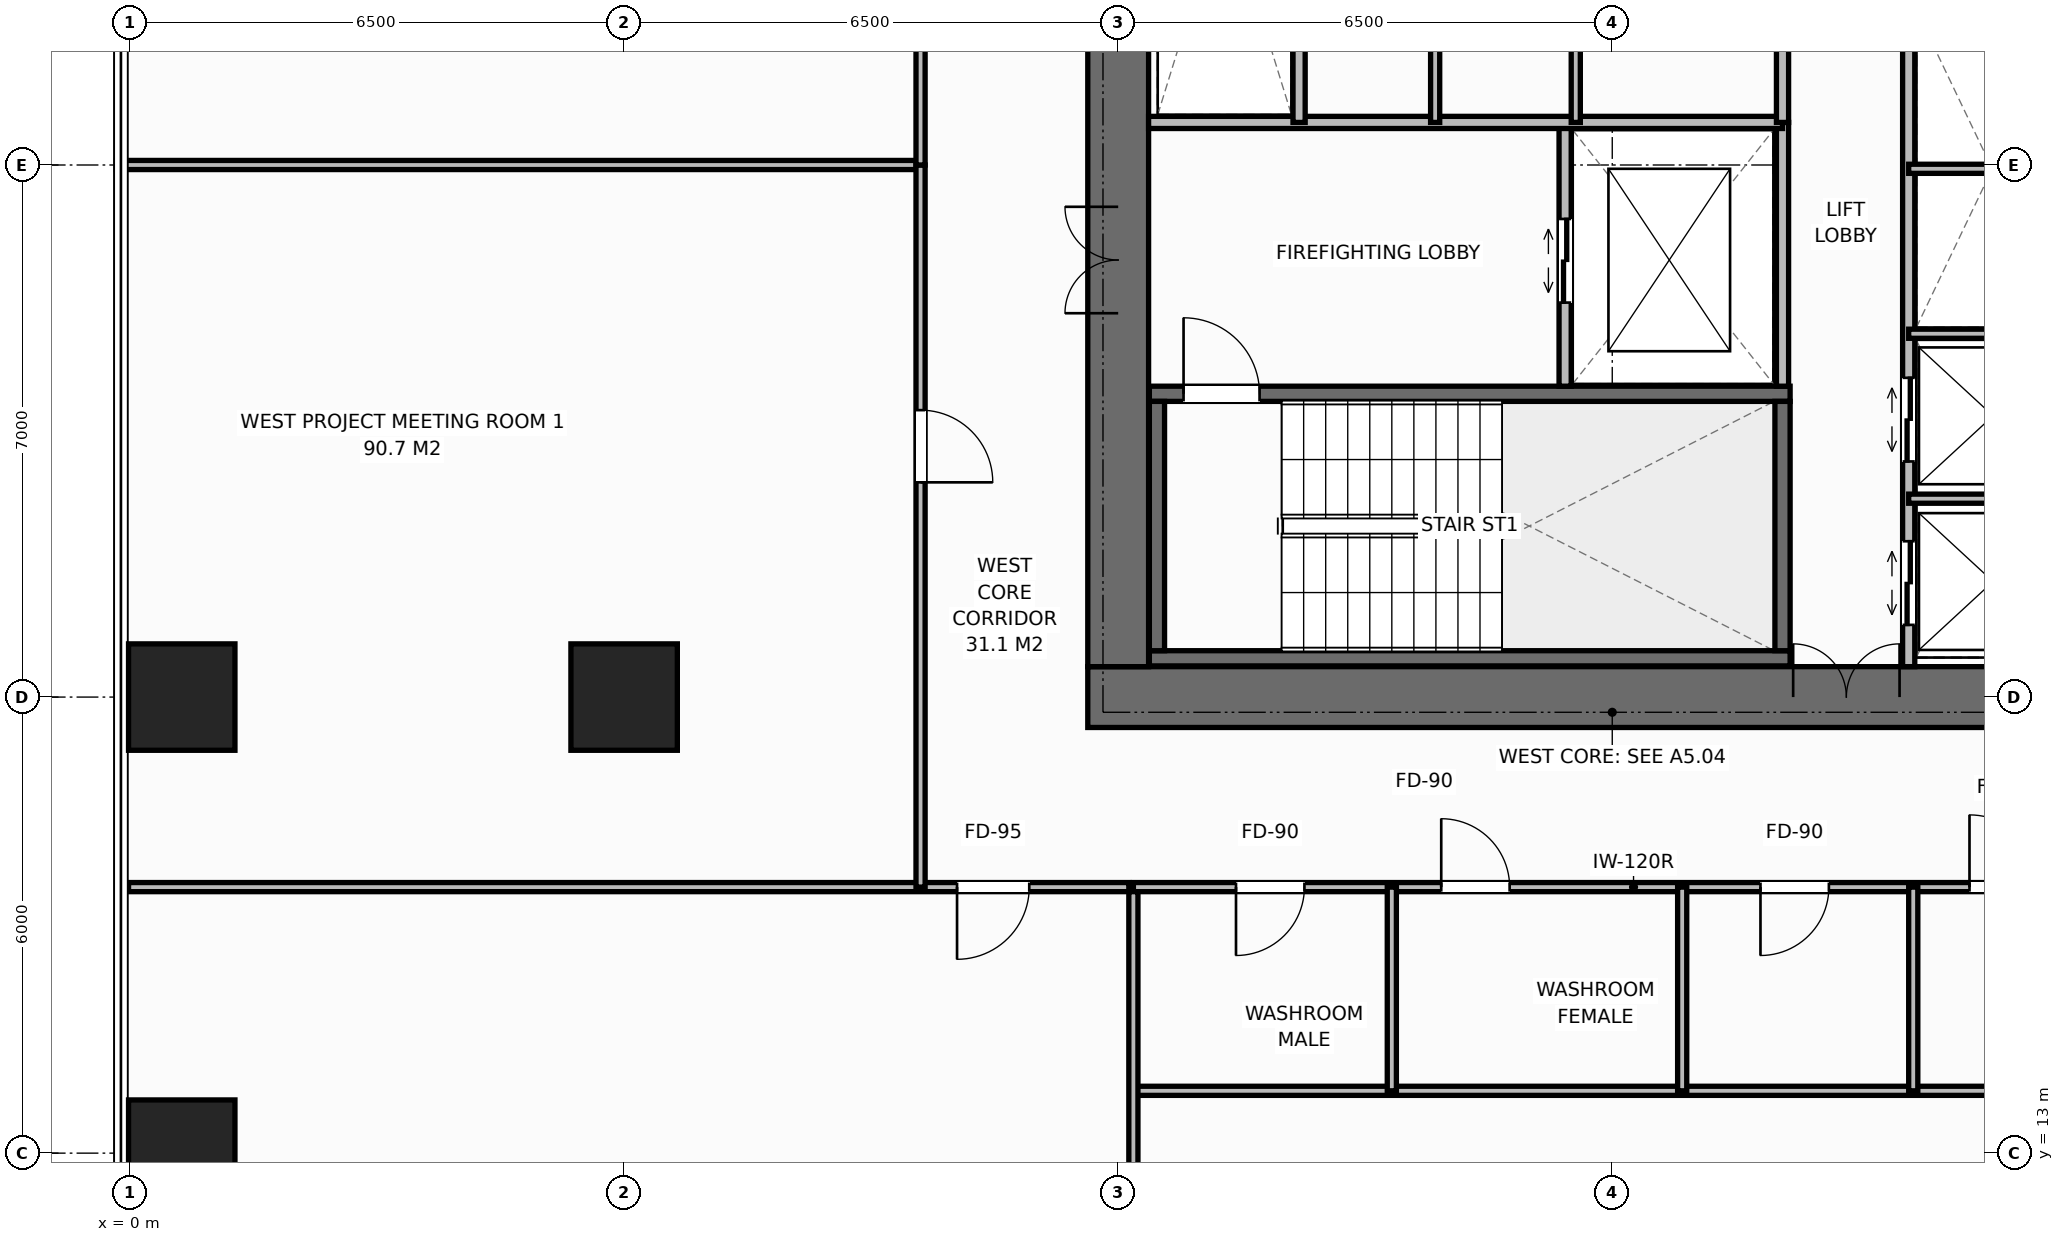
"""IFC4 building model, lengths in metres.
Left out: names, types, materials, properties, quantities, classifications, styles, units other than length and angle.
Written with IfcOpenShell. Run it as: python <this file> out.ifc"""

import sys

from ifc_helpers import new_model, si_unit, direction, frame, frame_2d, origin, origin_2d, place, context, subcontext, project, spatial, rectangle, extrude, element, fill, save


model = new_model("IFC4")
c1 = context("Model", 3, precision=1e-05, world=origin(), true_north=direction((0.0, 1.0)))
c2 = subcontext(c1, "Body", "Model", "MODEL_VIEW")
j1 = project(units=[si_unit("LENGTHUNIT", "METRE"), si_unit("PLANEANGLEUNIT", "RADIAN")], contexts=[c1])
p1 = place(None, origin())
s1 = spatial("IfcSite", under=j1, at=p1, CompositionType="ELEMENT")
p2 = place(p1, origin())
s2 = spatial("IfcBuilding", under=s1, at=p2, CompositionType="ELEMENT")
p3 = place(p2, frame((0.0, 0.0, 39.2)))
s3 = spatial("IfcBuildingStorey", under=s2, at=p3, CompositionType="ELEMENT", Elevation=39.2)
p4 = place(p3, frame((12.6, 19.0, 0.0), z_axis=(0.0, 0.0, 1.0), x_axis=(1.0, 0.0, 0.0)))
e1 = element("IfcWall", 1, at=p4, inside=s3, PredefinedType="SHEAR", context=c2, shape_type="SweptSolid", body=[
    extrude(rectangle(XDim=13.8, YDim=0.8, at=frame_2d((6.9, 0.0))), origin(), (0.0, 0.0, 1.0), 3.8),
])
p5 = place(p4, frame((9.28, 0.0, 0.0)))
e2 = element("IfcOpeningElement", 2, at=p5, cuts=e1, PredefinedType="OPENING", context=c2, shape_type="SweptSolid", body=[
    extrude(rectangle(XDim=1.4, YDim=2.2, at=frame_2d((0.7, 1.1))), frame((0.0, 0.41, 0.0), z_axis=(0.0, -1.0, 0.0), x_axis=(1.0, 0.0, 0.0)), (0.0, 0.0, 1.0), 0.82),
])
p6 = place(p3, frame((13.0, 19.4, 0.0), z_axis=(0.0, 0.0, 1.0), x_axis=(0.0, 1.0, 0.0)))
e3 = element("IfcWall", 3, at=p6, inside=s3, PredefinedType="SHEAR", context=c2, shape_type="SweptSolid", body=[
    extrude(rectangle(XDim=13.2, YDim=0.8, at=frame_2d((6.6, 0.0))), origin(), (0.0, 0.0, 1.0), 3.8),
])
p7 = place(p6, frame((4.65, 0.0, 0.0)))
e4 = element("IfcOpeningElement", 4, at=p7, cuts=e3, PredefinedType="OPENING", context=c2, shape_type="SweptSolid", body=[
    extrude(rectangle(XDim=1.4, YDim=2.2, at=frame_2d((0.7, 1.1))), frame((0.0, 0.41, 0.0), z_axis=(0.0, -1.0, 0.0), x_axis=(1.0, 0.0, 0.0)), (0.0, 0.0, 1.0), 0.82),
])
p8 = place(p3, frame((13.41, 19.51, 0.0), z_axis=(0.0, 0.0, 1.0), x_axis=(1.0, 0.0, 0.0)))
e5 = element("IfcWall", 5, at=p8, inside=s3, PredefinedType="SHEAR", context=c2, shape_type="SweptSolid", body=[
    extrude(rectangle(XDim=8.43, YDim=0.2, at=frame_2d((4.215, 0.0))), origin(), (0.0, 0.0, 1.0), 3.8),
])
p9 = place(p3, frame((13.41, 22.99, 0.0), z_axis=(0.0, 0.0, 1.0), x_axis=(1.0, 0.0, 0.0)))
e6 = element("IfcWall", 6, at=p9, inside=s3, PredefinedType="SHEAR", context=c2, shape_type="SweptSolid", body=[
    extrude(rectangle(XDim=8.43, YDim=0.2, at=frame_2d((4.215, 0.0))), origin(), (0.0, 0.0, 1.0), 3.8),
])
p10 = place(p9, frame((0.45, 0.0, 0.0)))
e7 = element("IfcOpeningElement", 7, at=p10, cuts=e6, PredefinedType="OPENING", context=c2, shape_type="SweptSolid", body=[
    extrude(rectangle(XDim=1.0, YDim=2.15, at=frame_2d((0.5, 1.075))), frame((0.0, 0.11, 0.0), z_axis=(0.0, -1.0, 0.0), x_axis=(1.0, 0.0, 0.0)), (0.0, 0.0, 1.0), 0.22),
])
for number, where, z_axis, x_axis in (
    (8, (13.51, 19.61, 0.0), (0.0, 0.0, 1.0), (0.0, 1.0, 0.0)),
    (9, (21.74, 19.61, 0.0), (0.0, 0.0, 1.0), (0.0, 1.0, 0.0)),
):
    element("IfcWall", number, at=place(p3, frame(where, z_axis=z_axis, x_axis=x_axis)), inside=s3, PredefinedType="SHEAR", context=c2, shape_type="SweptSolid", body=[
        extrude(rectangle(XDim=3.28, YDim=0.2, at=frame_2d((1.64, 0.0))), origin(), (0.0, 0.0, 1.0), 3.8),
    ])
for number, where, z_axis, x_axis in (
    (10, (6.5, 19.0, 0.0), (0.0, 0.0, 1.0), (1.0, 0.0, 0.0)),
    (11, (0.68, 13.0, 0.0), (0.0, 0.0, 1.0), (1.0, 0.0, 0.0)),
    (12, (0.68, 19.0, 0.0), (0.0, 0.0, 1.0), (1.0, 0.0, 0.0)),
):
    element("IfcColumn", number, at=place(p3, frame(where, z_axis=z_axis, x_axis=x_axis)), inside=s3, PredefinedType="COLUMN", context=c2, shape_type="SweptSolid", body=[
        extrude(rectangle(XDim=1.4, YDim=1.4, at=origin_2d()), origin(), (0.0, 0.0, 1.0), 3.8),
    ])
p11 = place(p3, frame((21.74, 23.09, 0.0), z_axis=(0.0, 0.0, 1.0), x_axis=(0.0, 1.0, 0.0)))
e13 = element("IfcWall", 13, at=p11, inside=s3, PredefinedType="STANDARD", context=c2, shape_type="SweptSolid", body=[
    extrude(rectangle(XDim=3.47, YDim=0.16, at=frame_2d((1.735, 0.0))), origin(), (0.0, 0.0, 1.0), 3.55),
])
p12 = place(p3, frame((18.88, 23.09, 0.0), z_axis=(0.0, 0.0, 1.0), x_axis=(0.0, 1.0, 0.0)))
e14 = element("IfcWall", 14, at=p12, inside=s3, PredefinedType="STANDARD", context=c2, shape_type="SweptSolid", body=[
    extrude(rectangle(XDim=3.47, YDim=0.16, at=frame_2d((1.735, 0.0))), origin(), (0.0, 0.0, 1.0), 3.55),
])
p13 = place(p12, frame((1.1, 0.0, 0.0)))
e15 = element("IfcOpeningElement", 15, at=p13, cuts=e14, PredefinedType="OPENING", context=c2, shape_type="SweptSolid", body=[
    extrude(rectangle(XDim=1.1, YDim=2.2, at=frame_2d((0.55, 1.1))), frame((0.0, 0.09, 0.0), z_axis=(0.0, -1.0, 0.0), x_axis=(1.0, 0.0, 0.0)), (0.0, 0.0, 1.0), 0.18),
])
p14 = place(p3, frame((13.4, 26.56, 0.0), z_axis=(0.0, 0.0, 1.0), x_axis=(1.0, 0.0, 0.0)))
e16 = element("IfcWall", 16, at=p14, inside=s3, PredefinedType="STANDARD", context=c2, shape_type="SweptSolid", body=[
    extrude(rectangle(XDim=8.34, YDim=0.16, at=frame_2d((4.17, 0.0))), origin(), (0.0, 0.0, 1.0), 3.55),
])
p15 = place(p3, frame((15.38, 26.56, 0.0), z_axis=(0.0, 0.0, 1.0), x_axis=(0.0, 1.0, 0.0)))
e17 = element("IfcWall", 17, at=p15, inside=s3, PredefinedType="STANDARD", context=c2, shape_type="SweptSolid", body=[
    extrude(rectangle(XDim=6.04, YDim=0.16, at=frame_2d((3.02, 0.0))), origin(), (0.0, 0.0, 1.0), 3.55),
])
for number, where, z_axis, x_axis in (
    (18, (17.17, 26.56, 0.0), (0.0, 0.0, 1.0), (0.0, 1.0, 0.0)),
    (19, (19.02, 26.56, 0.0), (0.0, 0.0, 1.0), (0.0, 1.0, 0.0)),
):
    element("IfcWall", number, at=place(p3, frame(where, z_axis=z_axis, x_axis=x_axis)), inside=s3, PredefinedType="PARTITIONING", context=c2, shape_type="SweptSolid", body=[
        extrude(rectangle(XDim=6.04, YDim=0.12, at=frame_2d((3.02, 0.0))), origin(), (0.0, 0.0, 1.0), 3.55),
    ])
p16 = place(p3, frame((21.74, 26.56, 0.0), z_axis=(0.0, 0.0, 1.0), x_axis=(0.0, 1.0, 0.0)))
e20 = element("IfcWall", 20, at=p16, inside=s3, PredefinedType="STANDARD", context=c2, shape_type="SweptSolid", body=[
    extrude(rectangle(XDim=6.04, YDim=0.16, at=frame_2d((3.02, 0.0))), origin(), (0.0, 0.0, 1.0), 3.55),
])
p17 = place(p3, frame((23.4, 19.4, 0.0), z_axis=(0.0, 0.0, 1.0), x_axis=(0.0, 1.0, 0.0)))
e21 = element("IfcWall", 21, at=p17, inside=s3, PredefinedType="STANDARD", context=c2, shape_type="SweptSolid", body=[
    extrude(rectangle(XDim=13.2, YDim=0.16, at=frame_2d((6.6, 0.0))), origin(), (0.0, 0.0, 1.0), 3.55),
])
p18 = place(p17, frame((0.55, 0.0, 0.0)))
e22 = element("IfcOpeningElement", 22, at=p18, cuts=e21, PredefinedType="OPENING", context=c2, shape_type="SweptSolid", body=[
    extrude(rectangle(XDim=1.1, YDim=2.2, at=frame_2d((0.55, 1.1))), frame((0.0, 0.09, 0.0), z_axis=(0.0, -1.0, 0.0), x_axis=(1.0, 0.0, 0.0)), (0.0, 0.0, 1.0), 0.18),
])
p19 = place(p17, frame((2.7, 0.0, 0.0)))
e23 = element("IfcOpeningElement", 23, at=p19, cuts=e21, PredefinedType="OPENING", context=c2, shape_type="SweptSolid", body=[
    extrude(rectangle(XDim=1.1, YDim=2.2, at=frame_2d((0.55, 1.1))), frame((0.0, 0.09, 0.0), z_axis=(0.0, -1.0, 0.0), x_axis=(1.0, 0.0, 0.0)), (0.0, 0.0, 1.0), 0.18),
])
for number, where, z_axis, x_axis in (
    (24, (23.4, 21.61, 0.0), (0.0, 0.0, 1.0), (1.0, 0.0, 0.0)),
    (25, (23.4, 23.78, 0.0), (0.0, 0.0, 1.0), (1.0, 0.0, 0.0)),
    (26, (23.4, 25.95, 0.0), (0.0, 0.0, 1.0), (1.0, 0.0, 0.0)),
):
    element("IfcWall", number, at=place(p3, frame(where, z_axis=z_axis, x_axis=x_axis)), inside=s3, PredefinedType="PARTITIONING", context=c2, shape_type="SweptSolid", body=[
        extrude(rectangle(XDim=2.2, YDim=0.12, at=frame_2d((1.1, 0.0))), origin(), (0.0, 0.0, 1.0), 3.55),
    ])
p20 = place(p3, frame((13.2, 16.5, 0.0), z_axis=(0.0, 0.0, 1.0), x_axis=(1.0, 0.0, 0.0)))
e27 = element("IfcWall", 27, at=p20, inside=s3, PredefinedType="PARTITIONING", context=c2, shape_type="SweptSolid", body=[
    extrude(rectangle(XDim=13.16, YDim=0.12, at=frame_2d((6.58, 0.0))), origin(), (0.0, 0.0, 1.0), 3.55),
])
p21 = place(p20, frame((1.35, 0.0, 0.0)))
e28 = element("IfcOpeningElement", 28, at=p21, cuts=e27, PredefinedType="OPENING", context=c2, shape_type="SweptSolid", body=[
    extrude(rectangle(XDim=0.9, YDim=2.15, at=frame_2d((0.45, 1.075))), frame((0.0, 0.07, 0.0), z_axis=(0.0, -1.0, 0.0), x_axis=(1.0, 0.0, 0.0)), (0.0, 0.0, 1.0), 0.14),
])
p22 = place(p20, frame((4.05, 0.0, 0.0)))
e29 = element("IfcOpeningElement", 29, at=p22, cuts=e27, PredefinedType="OPENING", context=c2, shape_type="SweptSolid", body=[
    extrude(rectangle(XDim=0.9, YDim=2.15, at=frame_2d((0.45, 1.075))), frame((0.0, 0.07, 0.0), z_axis=(0.0, -1.0, 0.0), x_axis=(1.0, 0.0, 0.0)), (0.0, 0.0, 1.0), 0.14),
])
p23 = place(p20, frame((8.25, 0.0, 0.0)))
e30 = element("IfcOpeningElement", 30, at=p23, cuts=e27, PredefinedType="OPENING", context=c2, shape_type="SweptSolid", body=[
    extrude(rectangle(XDim=0.9, YDim=2.15, at=frame_2d((0.45, 1.075))), frame((0.0, 0.07, 0.0), z_axis=(0.0, -1.0, 0.0), x_axis=(1.0, 0.0, 0.0)), (0.0, 0.0, 1.0), 0.14),
])
p24 = place(p20, frame((11.0, 0.0, 0.0)))
e31 = element("IfcOpeningElement", 31, at=p24, cuts=e27, PredefinedType="OPENING", context=c2, shape_type="SweptSolid", body=[
    extrude(rectangle(XDim=0.95, YDim=2.15, at=frame_2d((0.475, 1.075))), frame((0.0, 0.07, 0.0), z_axis=(0.0, -1.0, 0.0), x_axis=(1.0, 0.0, 0.0)), (0.0, 0.0, 1.0), 0.14),
])
p25 = place(p3, frame((13.2, 13.82, 0.0), z_axis=(0.0, 0.0, 1.0), x_axis=(1.0, 0.0, 0.0)))
e32 = element("IfcWall", 32, at=p25, inside=s3, PredefinedType="PARTITIONING", context=c2, shape_type="SweptSolid", body=[
    extrude(rectangle(XDim=13.16, YDim=0.12, at=frame_2d((6.58, 0.0))), origin(), (0.0, 0.0, 1.0), 3.55),
])
for number, where, z_axis, x_axis in (
    (33, (16.6, 13.82, 0.0), (0.0, 0.0, 1.0), (0.0, 1.0, 0.0)),
    (34, (20.42, 13.82, 0.0), (0.0, 0.0, 1.0), (0.0, 1.0, 0.0)),
    (35, (23.46, 13.82, 0.0), (0.0, 0.0, 1.0), (0.0, 1.0, 0.0)),
):
    element("IfcWall", number, at=place(p3, frame(where, z_axis=z_axis, x_axis=x_axis)), inside=s3, PredefinedType="PARTITIONING", context=c2, shape_type="SweptSolid", body=[
        extrude(rectangle(XDim=2.68, YDim=0.12, at=frame_2d((1.34, 0.0))), origin(), (0.0, 0.0, 1.0), 3.55),
    ])
p26 = place(p3, frame((13.2, 0.02, 0.0), z_axis=(0.0, 0.0, 1.0), x_axis=(0.0, 1.0, 0.0)))
e36 = element("IfcWall", 36, at=p26, inside=s3, PredefinedType="PARTITIONING", context=c2, shape_type="SweptSolid", body=[
    extrude(rectangle(XDim=16.42, YDim=0.12, at=frame_2d((8.21, 0.0))), origin(), (0.0, 0.0, 1.0), 2.9),
])
p27 = place(p3, frame((-0.02, 16.5, 0.0), z_axis=(0.0, 0.0, 1.0), x_axis=(1.0, 0.0, 0.0)))
e37 = element("IfcWall", 37, at=p27, inside=s3, PredefinedType="PARTITIONING", context=c2, shape_type="SweptSolid", body=[
    extrude(rectangle(XDim=13.16, YDim=0.12, at=frame_2d((6.58, 0.0))), origin(), (0.0, 0.0, 1.0), 3.55),
])
p28 = place(p27, frame((10.9, 0.0, 0.0)))
e38 = element("IfcOpeningElement", 38, at=p28, cuts=e37, PredefinedType="OPENING", context=c2, shape_type="SweptSolid", body=[
    extrude(rectangle(XDim=0.95, YDim=2.15, at=frame_2d((0.475, 1.075))), frame((0.0, 0.07, 0.0), z_axis=(0.0, -1.0, 0.0), x_axis=(1.0, 0.0, 0.0)), (0.0, 0.0, 1.0), 0.14),
])
p29 = place(p3, frame((-0.18, 26.0, 0.0), z_axis=(0.0, 0.0, 1.0), x_axis=(1.0, 0.0, 0.0)))
e39 = element("IfcWall", 39, at=p29, inside=s3, PredefinedType="PARTITIONING", context=c2, shape_type="SweptSolid", body=[
    extrude(rectangle(XDim=10.58, YDim=0.12, at=frame_2d((5.29, 0.0))), origin(), (0.0, 0.0, 1.0), 3.55),
])
p30 = place(p3, frame((10.4, 16.5, 0.0), z_axis=(0.0, 0.0, 1.0), x_axis=(0.0, 1.0, 0.0)))
e40 = element("IfcWall", 40, at=p30, inside=s3, PredefinedType="PARTITIONING", context=c2, shape_type="SweptSolid", body=[
    extrude(rectangle(XDim=9.5, YDim=0.12, at=frame_2d((4.75, 0.0))), origin(), (0.0, 0.0, 1.0), 3.55),
])
p31 = place(p30, frame((5.325, 0.0, 0.0)))
e41 = element("IfcOpeningElement", 41, at=p31, cuts=e40, PredefinedType="OPENING", context=c2, shape_type="SweptSolid", body=[
    extrude(rectangle(XDim=0.95, YDim=2.15, at=frame_2d((0.475, 1.075))), frame((0.0, 0.07, 0.0), z_axis=(0.0, -1.0, 0.0), x_axis=(1.0, 0.0, 0.0)), (0.0, 0.0, 1.0), 0.14),
])
p32 = place(p3, frame((10.4, 26.0, 0.0), z_axis=(0.0, 0.0, 1.0), x_axis=(0.0, 1.0, 0.0)))
e42 = element("IfcWall", 42, at=p32, inside=s3, PredefinedType="PARTITIONING", context=c2, shape_type="SweptSolid", body=[
    extrude(rectangle(XDim=9.5, YDim=0.12, at=frame_2d((4.75, 0.0))), origin(), (0.0, 0.0, 1.0), 3.55),
])
p33 = place(p32, frame((3.225, 0.0, 0.0)))
e43 = element("IfcOpeningElement", 43, at=p33, cuts=e42, PredefinedType="OPENING", context=c2, shape_type="SweptSolid", body=[
    extrude(rectangle(XDim=0.95, YDim=2.15, at=frame_2d((0.475, 1.075))), frame((0.0, 0.07, 0.0), z_axis=(0.0, -1.0, 0.0), x_axis=(1.0, 0.0, 0.0)), (0.0, 0.0, 1.0), 0.14),
])
p34 = place(p10, origin())
e44 = element("IfcDoor", 44, at=p34, inside=s3, OperationType="SINGLE_SWING_LEFT", PredefinedType="DOOR", context=c2, shape_type="SweptSolid", body=[
    extrude(rectangle(XDim=1.0, YDim=2.15, at=frame_2d((0.5, 1.075))), frame((0.0, 0.025, 0.0), z_axis=(0.0, -1.0, 0.0), x_axis=(1.0, 0.0, 0.0)), (0.0, 0.0, 1.0), 0.05),
])
fill(e7, e44)
p35 = place(p7, origin())
e45 = element("IfcDoor", 45, at=p35, inside=s3, OperationType="DOUBLE_DOOR_SINGLE_SWING", PredefinedType="DOOR", context=c2, shape_type="SweptSolid", body=[
    extrude(rectangle(XDim=1.4, YDim=2.2, at=frame_2d((0.7, 1.1))), frame((0.0, 0.025, 0.0), z_axis=(0.0, -1.0, 0.0), x_axis=(1.0, 0.0, 0.0)), (0.0, 0.0, 1.0), 0.05),
])
fill(e4, e45)
p36 = place(p13, origin())
e46 = element("IfcDoor", 46, at=p36, inside=s3, OperationType="DOUBLE_DOOR_SLIDING", PredefinedType="DOOR", context=c2, shape_type="SweptSolid", body=[
    extrude(rectangle(XDim=1.1, YDim=2.2, at=frame_2d((0.55, 1.1))), frame((0.0, 0.025, 0.0), z_axis=(0.0, -1.0, 0.0), x_axis=(1.0, 0.0, 0.0)), (0.0, 0.0, 1.0), 0.05),
])
fill(e15, e46)
p37 = place(p5, origin())
e47 = element("IfcDoor", 47, at=p37, inside=s3, OperationType="DOUBLE_DOOR_SINGLE_SWING", PredefinedType="DOOR", context=c2, shape_type="SweptSolid", body=[
    extrude(rectangle(XDim=1.4, YDim=2.2, at=frame_2d((0.7, 1.1))), frame((0.0, 0.125, 0.0), z_axis=(0.0, -1.0, 0.0), x_axis=(1.0, 0.0, 0.0)), (0.0, 0.0, 1.0), 0.05),
])
fill(e2, e47)
p38 = place(p18, origin())
e48 = element("IfcDoor", 48, at=p38, inside=s3, OperationType="DOUBLE_DOOR_SLIDING", PredefinedType="DOOR", context=c2, shape_type="SweptSolid", body=[
    extrude(rectangle(XDim=1.1, YDim=2.2, at=frame_2d((0.55, 1.1))), frame((0.0, 0.025, 0.0), z_axis=(0.0, -1.0, 0.0), x_axis=(1.0, 0.0, 0.0)), (0.0, 0.0, 1.0), 0.05),
])
fill(e22, e48)
p39 = place(p19, origin())
e49 = element("IfcDoor", 49, at=p39, inside=s3, OperationType="DOUBLE_DOOR_SLIDING", PredefinedType="DOOR", context=c2, shape_type="SweptSolid", body=[
    extrude(rectangle(XDim=1.1, YDim=2.2, at=frame_2d((0.55, 1.1))), frame((0.0, 0.025, 0.0), z_axis=(0.0, -1.0, 0.0), x_axis=(1.0, 0.0, 0.0)), (0.0, 0.0, 1.0), 0.05),
])
fill(e23, e49)
p40 = place(p21, origin())
e50 = element("IfcDoor", 50, at=p40, inside=s3, OperationType="SINGLE_SWING_RIGHT", PredefinedType="DOOR", context=c2, shape_type="SweptSolid", body=[
    extrude(rectangle(XDim=0.9, YDim=2.15, at=frame_2d((0.45, 1.075))), frame((0.0, 0.025, 0.0), z_axis=(0.0, -1.0, 0.0), x_axis=(1.0, 0.0, 0.0)), (0.0, 0.0, 1.0), 0.05),
])
fill(e28, e50)
p41 = place(p22, origin())
e51 = element("IfcDoor", 51, at=p41, inside=s3, OperationType="SINGLE_SWING_LEFT", PredefinedType="DOOR", context=c2, shape_type="SweptSolid", body=[
    extrude(rectangle(XDim=0.9, YDim=2.15, at=frame_2d((0.45, 1.075))), frame((0.0, 0.025, 0.0), z_axis=(0.0, -1.0, 0.0), x_axis=(1.0, 0.0, 0.0)), (0.0, 0.0, 1.0), 0.05),
])
fill(e29, e51)
p42 = place(p23, origin())
e52 = element("IfcDoor", 52, at=p42, inside=s3, OperationType="SINGLE_SWING_RIGHT", PredefinedType="DOOR", context=c2, shape_type="SweptSolid", body=[
    extrude(rectangle(XDim=0.9, YDim=2.15, at=frame_2d((0.45, 1.075))), frame((0.0, 0.025, 0.0), z_axis=(0.0, -1.0, 0.0), x_axis=(1.0, 0.0, 0.0)), (0.0, 0.0, 1.0), 0.05),
])
fill(e30, e52)
p43 = place(p24, origin())
e53 = element("IfcDoor", 53, at=p43, inside=s3, OperationType="SINGLE_SWING_LEFT", PredefinedType="DOOR", context=c2, shape_type="SweptSolid", body=[
    extrude(rectangle(XDim=0.95, YDim=2.15, at=frame_2d((0.475, 1.075))), frame((0.0, 0.025, 0.0), z_axis=(0.0, -1.0, 0.0), x_axis=(1.0, 0.0, 0.0)), (0.0, 0.0, 1.0), 0.05),
])
fill(e31, e53)
p44 = place(p28, origin())
e54 = element("IfcDoor", 54, at=p44, inside=s3, OperationType="SINGLE_SWING_RIGHT", PredefinedType="DOOR", context=c2, shape_type="SweptSolid", body=[
    extrude(rectangle(XDim=0.95, YDim=2.15, at=frame_2d((0.475, 1.075))), frame((0.0, 0.025, 0.0), z_axis=(0.0, -1.0, 0.0), x_axis=(1.0, 0.0, 0.0)), (0.0, 0.0, 1.0), 0.05),
])
fill(e38, e54)
p45 = place(p31, origin())
e55 = element("IfcDoor", 55, at=p45, inside=s3, OperationType="SINGLE_SWING_RIGHT", PredefinedType="DOOR", context=c2, shape_type="SweptSolid", body=[
    extrude(rectangle(XDim=0.95, YDim=2.15, at=frame_2d((0.475, 1.075))), frame((0.0, 0.025, 0.0), z_axis=(0.0, -1.0, 0.0), x_axis=(1.0, 0.0, 0.0)), (0.0, 0.0, 1.0), 0.05),
])
fill(e41, e55)
save(model, sys.argv[1])
